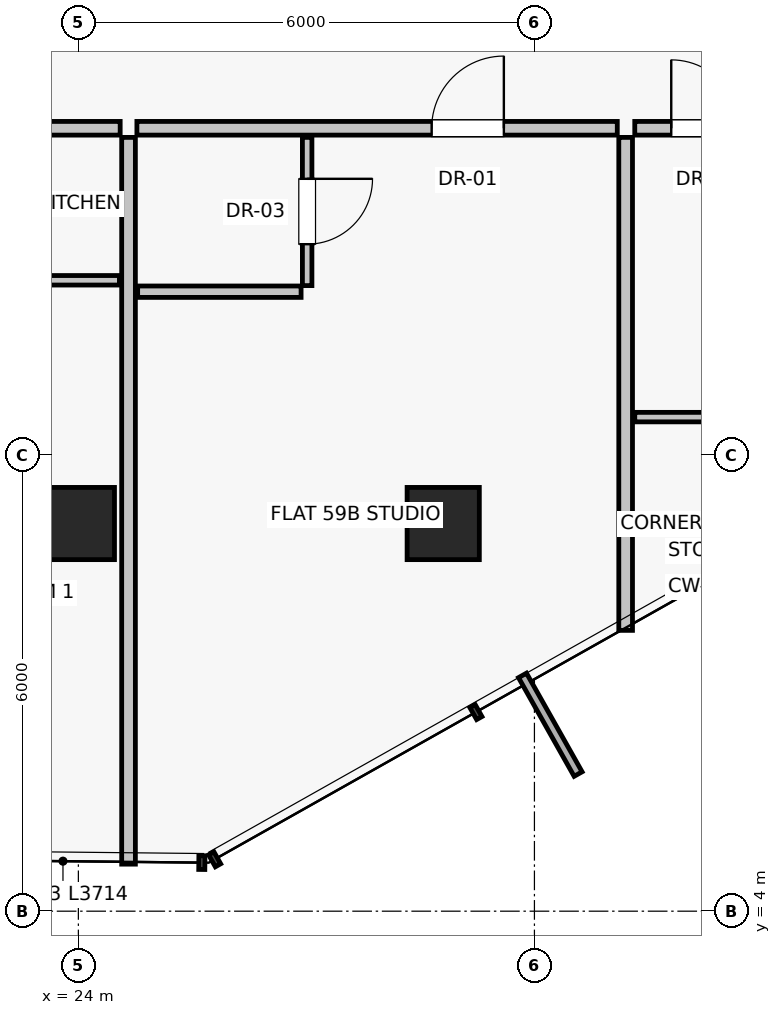
"""IFC4 building model, lengths in metres.
Left out: names, types, materials, properties, quantities, classifications, styles, units other than length and angle.
Written with IfcOpenShell. Run it as: python <this file> out.ifc"""

import sys

from ifc_helpers import new_model, si_unit, direction, frame, frame_2d, origin, origin_2d, place, context, subcontext, project, spatial, rectangle, extrude, source, transform, mapped, element, fill, save


model = new_model("IFC4")
c1 = context("Model", 3, precision=1e-05, world=origin(), true_north=direction((0.0, 1.0)))
c2 = subcontext(c1, "Body", "Model", "MODEL_VIEW")
j1 = project(units=[si_unit("LENGTHUNIT", "METRE"), si_unit("PLANEANGLEUNIT", "RADIAN")], contexts=[c1])
p1 = place(None, origin())
s1 = spatial("IfcSite", under=j1, at=p1, CompositionType="ELEMENT")
p2 = place(p1, origin())
s2 = spatial("IfcBuilding", under=s1, at=p2, CompositionType="ELEMENT")
p3 = place(p2, frame((0.0, 0.0, 208.1)))
s3 = spatial("IfcBuildingStorey", under=s2, at=p3, CompositionType="ELEMENT", Elevation=208.1)
for number, where, z_axis, x_axis in (
    (1, (24.0, 9.1, 0.0), (0.0, 0.0, 1.0), (1.0, 0.0, 0.0)),
    (2, (28.8, 9.1, 0.0), (0.0, 0.0, 1.0), (1.0, 0.0, 0.0)),
):
    element("IfcColumn", number, at=place(p3, frame(where, z_axis=z_axis, x_axis=x_axis)), inside=s3, PredefinedType="COLUMN", context=c2, shape_type="SweptSolid", body=[
        extrude(rectangle(XDim=0.95, YDim=0.95, at=origin_2d()), origin(), (0.0, 0.0, 1.0), 3.25),
    ])
p4 = place(p3, frame((31.2, 14.18, 0.0), z_axis=(0.0, 0.0, 1.0), x_axis=(0.0, -1.0, 0.0)))
e3 = element("IfcWall", 3, at=p4, inside=s3, PredefinedType="PARTITIONING", context=c2, shape_type="SweptSolid", body=[
    extrude(rectangle(XDim=6.486, YDim=0.18, at=frame_2d((3.243, 0.0))), origin(), (0.0, 0.0, 1.0), 2.97),
])
p5 = place(p3, frame((15.31, 14.3, 0.0), z_axis=(0.0, 0.0, 1.0), x_axis=(1.0, 0.0, 0.0)))
e4 = element("IfcWall", 4, at=p5, inside=s3, PredefinedType="PARTITIONING", context=c2, shape_type="SweptSolid", body=[
    extrude(rectangle(XDim=9.24, YDim=0.18, at=frame_2d((4.62, 0.0))), origin(), (0.0, 0.0, 1.0), 2.97),
])
p6 = place(p5, frame((3.142, 0.0, 0.0)))
e5 = element("IfcOpeningElement", 5, at=p6, cuts=e4, PredefinedType="OPENING", context=c2, shape_type="SweptSolid", body=[
    extrude(rectangle(XDim=0.95, YDim=2.02, at=frame_2d((0.475, 1.01))), frame((0.0, 0.1, 0.0), z_axis=(0.0, -1.0, 0.0), x_axis=(1.0, 0.0, 0.0)), (0.0, 0.0, 1.0), 0.2),
])
p7 = place(p3, frame((20.503, 12.3, 0.0), z_axis=(0.0, 0.0, 1.0), x_axis=(1.0, 0.0, 0.0)))
e6 = element("IfcWall", 6, at=p7, inside=s3, PredefinedType="PARTITIONING", context=c2, shape_type="SweptSolid", body=[
    extrude(rectangle(XDim=4.037, YDim=0.125, at=frame_2d((2.019, 0.0))), origin(), (0.0, 0.0, 1.0), 2.97),
])
p8 = place(p3, frame((24.66, 14.18, 0.0), z_axis=(0.0, 0.0, 1.0), x_axis=(0.0, -1.0, 0.0)))
e7 = element("IfcWall", 7, at=p8, inside=s3, PredefinedType="PARTITIONING", context=c2, shape_type="SweptSolid", body=[
    extrude(rectangle(XDim=9.561, YDim=0.18, at=frame_2d((4.781, 0.0))), origin(), (0.0, 0.0, 1.0), 2.97),
])
p9 = place(p3, frame((24.77, 14.3, 0.0), z_axis=(0.0, 0.0, 1.0), x_axis=(1.0, 0.0, 0.0)))
e8 = element("IfcWall", 8, at=p9, inside=s3, PredefinedType="PARTITIONING", context=c2, shape_type="SweptSolid", body=[
    extrude(rectangle(XDim=6.32, YDim=0.18, at=frame_2d((3.16, 0.0))), origin(), (0.0, 0.0, 1.0), 2.97),
])
p10 = place(p9, frame((3.878, 0.0, 0.0)))
e9 = element("IfcOpeningElement", 9, at=p10, cuts=e8, PredefinedType="OPENING", context=c2, shape_type="SweptSolid", body=[
    extrude(rectangle(XDim=0.95, YDim=2.02, at=frame_2d((0.475, 1.01))), frame((0.0, 0.1, 0.0), z_axis=(0.0, -1.0, 0.0), x_axis=(1.0, 0.0, 0.0)), (0.0, 0.0, 1.0), 0.2),
])
p11 = place(p3, frame((27.01, 14.18, 0.0), z_axis=(0.0, 0.0, 1.0), x_axis=(0.0, -1.0, 0.0)))
e10 = element("IfcWall", 10, at=p11, inside=s3, PredefinedType="PARTITIONING", context=c2, shape_type="SweptSolid", body=[
    extrude(rectangle(XDim=1.95, YDim=0.125, at=frame_2d((0.975, 0.0))), origin(), (0.0, 0.0, 1.0), 2.97),
])
p12 = place(p11, frame((0.545, 0.0, 0.0)))
e11 = element("IfcOpeningElement", 11, at=p12, cuts=e10, PredefinedType="OPENING", context=c2, shape_type="SweptSolid", body=[
    extrude(rectangle(XDim=0.86, YDim=2.01, at=frame_2d((0.43, 1.005))), frame((0.0, 0.073, 0.0), z_axis=(0.0, -1.0, 0.0), x_axis=(1.0, 0.0, 0.0)), (0.0, 0.0, 1.0), 0.145),
])
p13 = place(p3, frame((24.78, 12.15, 0.0), z_axis=(0.0, 0.0, 1.0), x_axis=(1.0, 0.0, 0.0)))
e12 = element("IfcWall", 12, at=p13, inside=s3, PredefinedType="PARTITIONING", context=c2, shape_type="SweptSolid", body=[
    extrude(rectangle(XDim=2.15, YDim=0.15, at=frame_2d((1.075, 0.0))), origin(), (0.0, 0.0, 1.0), 2.97),
])
p14 = place(p3, frame((31.32, 14.3, 0.0), z_axis=(0.0, 0.0, 1.0), x_axis=(1.0, 0.0, 0.0)))
e13 = element("IfcWall", 13, at=p14, inside=s3, PredefinedType="PARTITIONING", context=c2, shape_type="SweptSolid", body=[
    extrude(rectangle(XDim=1.86, YDim=0.18, at=frame_2d((0.93, 0.0))), origin(), (0.0, 0.0, 1.0), 2.97),
])
p15 = place(p14, frame((0.48, 0.0, 0.0)))
e14 = element("IfcOpeningElement", 14, at=p15, cuts=e13, PredefinedType="OPENING", context=c2, shape_type="SweptSolid", body=[
    extrude(rectangle(XDim=0.9, YDim=2.01, at=frame_2d((0.45, 1.005))), frame((0.0, 0.1, 0.0), z_axis=(0.0, -1.0, 0.0), x_axis=(1.0, 0.0, 0.0)), (0.0, 0.0, 1.0), 0.2),
])
p16 = place(p3, frame((31.32, 10.5, 0.0), z_axis=(0.0, 0.0, 1.0), x_axis=(1.0, 0.0, 0.0)))
e15 = element("IfcWall", 15, at=p16, inside=s3, PredefinedType="PARTITIONING", context=c2, shape_type="SweptSolid", body=[
    extrude(rectangle(XDim=4.859, YDim=0.125, at=frame_2d((2.43, 0.0))), origin(), (0.0, 0.0, 1.0), 2.97),
])
p17 = place(p16, frame((2.0, 0.0, 0.0)))
e16 = element("IfcOpeningElement", 16, at=p17, cuts=e15, PredefinedType="OPENING", context=c2, shape_type="SweptSolid", body=[
    extrude(rectangle(XDim=0.86, YDim=2.01, at=frame_2d((0.43, 1.005))), frame((0.0, 0.073, 0.0), z_axis=(0.0, -1.0, 0.0), x_axis=(1.0, 0.0, 0.0)), (0.0, 0.0, 1.0), 0.145),
])
m1 = source(origin(), c2, "Body", "SweptSolid", [
    extrude(rectangle(XDim=0.95, YDim=2.02, at=frame_2d((0.475, 1.01))), frame((0.0, 0.025, 0.0), z_axis=(0.0, -1.0, 0.0), x_axis=(1.0, 0.0, 0.0)), (0.0, 0.0, 1.0), 0.05),
])
p18 = place(p10, origin())
e17 = element("IfcDoor", 17, at=p18, inside=s3, OperationType="SINGLE_SWING_RIGHT", PredefinedType="DOOR", context=c2, shape_type="MappedRepresentation", body=[
    mapped(m1, transform((0.0, 0.0, 0.0), scale=1.0)),
])
fill(e9, e17)
m2 = source(origin(), c2, "Body", "SweptSolid", [
    extrude(rectangle(XDim=0.86, YDim=2.01, at=frame_2d((0.43, 1.005))), frame((0.0, 0.025, 0.0), z_axis=(0.0, -1.0, 0.0), x_axis=(1.0, 0.0, 0.0)), (0.0, 0.0, 1.0), 0.05),
])
p19 = place(p12, origin())
e18 = element("IfcDoor", 18, at=p19, inside=s3, OperationType="SINGLE_SWING_LEFT", PredefinedType="DOOR", context=c2, shape_type="MappedRepresentation", body=[
    mapped(m2, transform((0.0, 0.0, 0.0), scale=1.0)),
])
fill(e11, e18)
m3 = source(origin(), c2, "Body", "SweptSolid", [
    extrude(rectangle(XDim=0.9, YDim=2.01, at=frame_2d((0.45, 1.005))), frame((0.0, 0.025, 0.0), z_axis=(0.0, -1.0, 0.0), x_axis=(1.0, 0.0, 0.0)), (0.0, 0.0, 1.0), 0.05),
])
p20 = place(p15, origin())
e19 = element("IfcDoor", 19, at=p20, inside=s3, OperationType="SINGLE_SWING_LEFT", PredefinedType="DOOR", context=c2, shape_type="MappedRepresentation", body=[
    mapped(m3, transform((0.0, 0.0, 0.0), scale=1.0)),
])
fill(e14, e19)
save(model, sys.argv[1])
